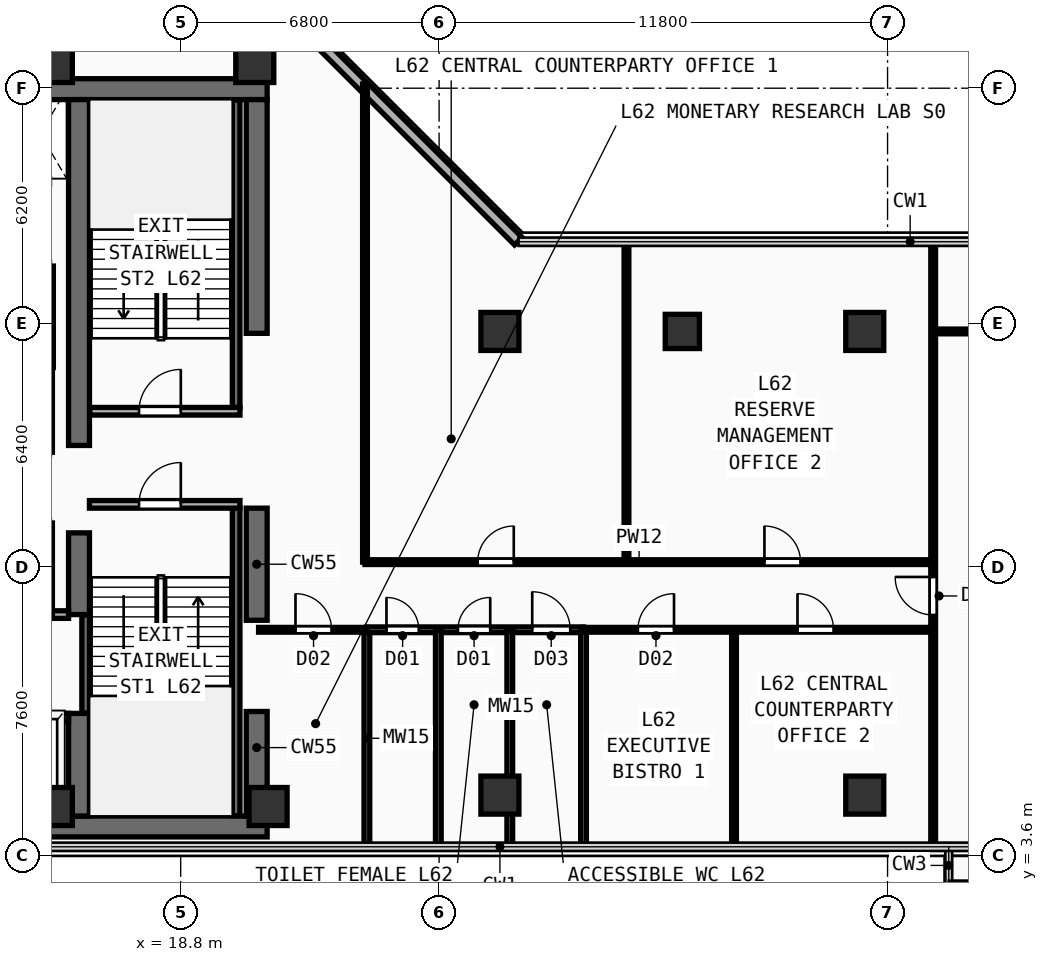
"""IFC4 building model, lengths in metres.
Left out: names, types, materials, properties, quantities, classifications, styles, units other than length and angle.
Written with IfcOpenShell. Run it as: python <this file> out.ifc"""

import sys

from ifc_helpers import new_model, si_unit, direction, frame, frame_2d, origin, origin_2d, place, context, subcontext, project, spatial, rectangle, extrude, element, fill, save


model = new_model("IFC4")
c1 = context("Model", 3, precision=1e-05, world=origin(), true_north=direction((0.0, 1.0)))
c2 = subcontext(c1, "Body", "Model", "MODEL_VIEW")
j1 = project(units=[si_unit("LENGTHUNIT", "METRE"), si_unit("PLANEANGLEUNIT", "RADIAN")], contexts=[c1])
p1 = place(None, origin())
s1 = spatial("IfcSite", under=j1, at=p1, CompositionType="ELEMENT")
p2 = place(p1, origin())
s2 = spatial("IfcBuilding", under=s1, at=p2, CompositionType="ELEMENT")
p3 = place(p2, frame((0.0, 0.0, 242.5)))
s3 = spatial("IfcBuildingStorey", under=s2, at=p3, CompositionType="ELEMENT", Elevation=242.5)
for number, where, z_axis, x_axis in (
    (1, (7.175, 4.375, 0.0), (0.0, 0.0, 1.0), (1.0, 0.0, 0.0)),
    (2, (7.175, 23.775, 0.0), (0.0, 0.0, 1.0), (1.0, 0.0, 0.0)),
):
    element("IfcWall", number, at=place(p3, frame(where, z_axis=z_axis, x_axis=x_axis)), inside=s3, PredefinedType="SHEAR", context=c2, shape_type="SweptSolid", body=[
        extrude(rectangle(XDim=13.9, YDim=0.55, at=frame_2d((6.95, 0.0))), origin(), (0.0, 0.0, 1.0), 3.56),
    ])
p4 = place(p3, frame((20.8, 4.65, 0.0), z_axis=(0.0, 0.0, 1.0), x_axis=(0.0, 1.0, 0.0)))
e3 = element("IfcWall", 3, at=p4, inside=s3, PredefinedType="SHEAR", context=c2, shape_type="SweptSolid", body=[
    extrude(rectangle(XDim=2.75, YDim=0.55, at=frame_2d((1.375, 0.0))), origin(), (0.0, 0.0, 1.0), 3.56),
])
p5 = place(p3, frame((20.8, 9.8, 0.0), z_axis=(0.0, 0.0, 1.0), x_axis=(0.0, 1.0, 0.0)))
e4 = element("IfcWall", 4, at=p5, inside=s3, PredefinedType="SHEAR", context=c2, shape_type="SweptSolid", body=[
    extrude(rectangle(XDim=2.95, YDim=0.55, at=frame_2d((1.475, 0.0))), origin(), (0.0, 0.0, 1.0), 3.56),
])
p6 = place(p3, frame((20.8, 17.35, 0.0), z_axis=(0.0, 0.0, 1.0), x_axis=(0.0, 1.0, 0.0)))
e5 = element("IfcWall", 5, at=p6, inside=s3, PredefinedType="SHEAR", context=c2, shape_type="SweptSolid", body=[
    extrude(rectangle(XDim=6.15, YDim=0.55, at=frame_2d((3.075, 0.0))), origin(), (0.0, 0.0, 1.0), 3.56),
])
p7 = place(p3, frame((16.125, 4.65, 0.0), z_axis=(0.0, 0.0, 1.0), x_axis=(0.0, 1.0, 0.0)))
e6 = element("IfcWall", 6, at=p7, inside=s3, PredefinedType="SHEAR", context=c2, shape_type="SweptSolid", body=[
    extrude(rectangle(XDim=2.7, YDim=0.55, at=frame_2d((1.35, 0.0))), origin(), (0.0, 0.0, 1.0), 3.56),
])
p8 = place(p3, frame((16.125, 9.95, 0.0), z_axis=(0.0, 0.0, 1.0), x_axis=(0.0, 1.0, 0.0)))
e7 = element("IfcWall", 7, at=p8, inside=s3, PredefinedType="SHEAR", context=c2, shape_type="SweptSolid", body=[
    extrude(rectangle(XDim=2.15, YDim=0.55, at=frame_2d((1.075, 0.0))), origin(), (0.0, 0.0, 1.0), 3.56),
])
p9 = place(p3, frame((16.125, 14.4, 0.0), z_axis=(0.0, 0.0, 1.0), x_axis=(0.0, 1.0, 0.0)))
e8 = element("IfcWall", 8, at=p9, inside=s3, PredefinedType="SHEAR", context=c2, shape_type="SweptSolid", body=[
    extrude(rectangle(XDim=9.1, YDim=0.55, at=frame_2d((4.55, 0.0))), origin(), (0.0, 0.0, 1.0), 3.56),
])
for number, where, z_axis, x_axis in (
    (9, (15.45, 4.9, 0.0), (0.0, 0.0, 1.0), (1.0, 0.0, 0.0)),
    (10, (21.1, 4.9, 0.0), (0.0, 0.0, 1.0), (1.0, 0.0, 0.0)),
    (11, (15.45, 24.45, 0.0), (0.0, 0.0, 1.0), (1.0, 0.0, 0.0)),
    (12, (20.75, 24.45, 0.0), (0.0, 0.0, 1.0), (1.0, 0.0, 0.0)),
    (13, (27.2, 5.2, 0.0), (0.0, 0.0, 1.0), (1.0, 0.0, 0.0)),
    (14, (36.8, 5.2, 0.0), (0.0, 0.0, 1.0), (1.0, 0.0, 0.0)),
    (15, (27.2, 17.4, 0.0), (0.0, 0.0, 1.0), (1.0, 0.0, 0.0)),
    (16, (36.8, 17.4, 0.0), (0.0, 0.0, 1.0), (1.0, 0.0, 0.0)),
):
    element("IfcColumn", number, at=place(p3, frame(where, z_axis=z_axis, x_axis=x_axis)), inside=s3, PredefinedType="COLUMN", context=c2, shape_type="SweptSolid", body=[
        extrude(rectangle(XDim=1.0, YDim=1.0, at=origin_2d()), origin(), (0.0, 0.0, 1.0), 3.56),
    ])
p10 = place(p3, frame((32.0, 17.4, 0.0), z_axis=(0.0, 0.0, 1.0), x_axis=(1.0, 0.0, 0.0)))
e17 = element("IfcColumn", 17, at=p10, inside=s3, PredefinedType="COLUMN", context=c2, shape_type="SweptSolid", body=[
    extrude(rectangle(XDim=0.9, YDim=0.9, at=origin_2d()), origin(), (0.0, 0.0, 1.0), 3.56),
])
p11 = place(p3, frame((27.685, 19.775, 0.0), z_axis=(0.0, 0.0, 1.0), x_axis=(-0.707106781187, 0.707106781187, 0.0)))
e18 = element("IfcWall", 18, at=p11, inside=s3, PredefinedType="SOLIDWALL", context=c2, shape_type="SweptSolid", body=[
    extrude(rectangle(XDim=9.207, YDim=0.28, at=frame_2d((4.603, 0.0))), origin(), (0.0, 0.0, 1.0), 3.56),
])
p12 = place(p3, frame((16.3, 7.36, 0.0), z_axis=(0.0, 0.0, 1.0), x_axis=(0.0, 1.0, 0.0)))
e19 = element("IfcWall", 19, at=p12, inside=s3, PredefinedType="SHEAR", context=c2, shape_type="SweptSolid", body=[
    extrude(rectangle(XDim=2.58, YDim=0.2, at=frame_2d((1.29, 0.0))), origin(), (0.0, 0.0, 1.0), 3.56),
])
p13 = place(p3, frame((20.26, 4.66, 0.0), z_axis=(0.0, 0.0, 1.0), x_axis=(0.0, 1.0, 0.0)))
e20 = element("IfcWall", 20, at=p13, inside=s3, PredefinedType="SHEAR", context=c2, shape_type="SweptSolid", body=[
    extrude(rectangle(XDim=8.09, YDim=0.2, at=frame_2d((4.045, 0.0))), origin(), (0.0, 0.0, 1.0), 3.56),
])
p14 = place(p3, frame((16.4, 12.85, 0.0), z_axis=(0.0, 0.0, 1.0), x_axis=(1.0, 0.0, 0.0)))
e21 = element("IfcWall", 21, at=p14, inside=s3, PredefinedType="PARTITIONING", context=c2, shape_type="SweptSolid", body=[
    extrude(rectangle(XDim=3.96, YDim=0.2, at=frame_2d((1.98, 0.0))), origin(), (0.0, 0.0, 1.0), 3.56),
])
p15 = place(p14, frame((1.304, 0.0, 0.0)))
e22 = element("IfcOpeningElement", 22, at=p15, cuts=e21, PredefinedType="OPENING", context=c2, shape_type="SweptSolid", body=[
    extrude(rectangle(XDim=1.1, YDim=2.2, at=frame_2d((0.55, 1.1))), frame((0.0, 0.11, 0.0), z_axis=(0.0, -1.0, 0.0), x_axis=(1.0, 0.0, 0.0)), (0.0, 0.0, 1.0), 0.22),
])
p16 = place(p3, frame((20.26, 15.4, 0.0), z_axis=(0.0, 0.0, 1.0), x_axis=(0.0, 1.0, 0.0)))
e23 = element("IfcWall", 23, at=p16, inside=s3, PredefinedType="SHEAR", context=c2, shape_type="SweptSolid", body=[
    extrude(rectangle(XDim=8.09, YDim=0.2, at=frame_2d((4.045, 0.0))), origin(), (0.0, 0.0, 1.0), 3.56),
])
p17 = place(p3, frame((16.41, 15.3, 0.0), z_axis=(0.0, 0.0, 1.0), x_axis=(1.0, 0.0, 0.0)))
e24 = element("IfcWall", 24, at=p17, inside=s3, PredefinedType="PARTITIONING", context=c2, shape_type="SweptSolid", body=[
    extrude(rectangle(XDim=3.95, YDim=0.2, at=frame_2d((1.975, 0.0))), origin(), (0.0, 0.0, 1.0), 3.56),
])
p18 = place(p17, frame((1.294, 0.0, 0.0)))
e25 = element("IfcOpeningElement", 25, at=p18, cuts=e24, PredefinedType="OPENING", context=c2, shape_type="SweptSolid", body=[
    extrude(rectangle(XDim=1.1, YDim=2.2, at=frame_2d((0.55, 1.1))), frame((0.0, 0.11, 0.0), z_axis=(0.0, -1.0, 0.0), x_axis=(1.0, 0.0, 0.0)), (0.0, 0.0, 1.0), 0.22),
])
p19 = place(p3, frame((7.5, 7.25, 0.0), z_axis=(0.0, 0.0, 1.0), x_axis=(1.0, 0.0, 0.0)))
e26 = element("IfcWall", 26, at=p19, inside=s3, PredefinedType="PARTITIONING", context=c2, shape_type="SweptSolid", body=[
    extrude(rectangle(XDim=8.35, YDim=0.2, at=frame_2d((4.175, 0.0))), origin(), (0.0, 0.0, 1.0), 3.56),
])
p20 = place(p19, frame((0.53, 0.0, 0.0)))
e27 = element("IfcOpeningElement", 27, at=p20, cuts=e26, PredefinedType="OPENING", context=c2, shape_type="SweptSolid", body=[
    extrude(rectangle(XDim=1.1, YDim=2.2, at=frame_2d((0.55, 1.1))), frame((0.0, 0.11, 0.0), z_axis=(0.0, -1.0, 0.0), x_axis=(1.0, 0.0, 0.0)), (0.0, 0.0, 1.0), 0.22),
])
p21 = place(p19, frame((2.37, 0.0, 0.0)))
e28 = element("IfcOpeningElement", 28, at=p21, cuts=e26, PredefinedType="OPENING", context=c2, shape_type="SweptSolid", body=[
    extrude(rectangle(XDim=1.1, YDim=2.2, at=frame_2d((0.55, 1.1))), frame((0.0, 0.11, 0.0), z_axis=(0.0, -1.0, 0.0), x_axis=(1.0, 0.0, 0.0)), (0.0, 0.0, 1.0), 0.22),
])
p22 = place(p19, frame((4.33, 0.0, 0.0)))
e29 = element("IfcOpeningElement", 29, at=p22, cuts=e26, PredefinedType="OPENING", context=c2, shape_type="SweptSolid", body=[
    extrude(rectangle(XDim=1.1, YDim=2.2, at=frame_2d((0.55, 1.1))), frame((0.0, 0.11, 0.0), z_axis=(0.0, -1.0, 0.0), x_axis=(1.0, 0.0, 0.0)), (0.0, 0.0, 1.0), 0.22),
])
p23 = place(p19, frame((6.5, 0.0, 0.0)))
e30 = element("IfcOpeningElement", 30, at=p23, cuts=e26, PredefinedType="OPENING", context=c2, shape_type="SweptSolid", body=[
    extrude(rectangle(XDim=1.1, YDim=2.2, at=frame_2d((0.55, 1.1))), frame((0.0, 0.11, 0.0), z_axis=(0.0, -1.0, 0.0), x_axis=(1.0, 0.0, 0.0)), (0.0, 0.0, 1.0), 0.22),
])
p24 = place(p3, frame((7.5, 9.95, 0.0), z_axis=(0.0, 0.0, 1.0), x_axis=(1.0, 0.0, 0.0)))
e31 = element("IfcWall", 31, at=p24, inside=s3, PredefinedType="PARTITIONING", context=c2, shape_type="SweptSolid", body=[
    extrude(rectangle(XDim=8.35, YDim=0.2, at=frame_2d((4.175, 0.0))), origin(), (0.0, 0.0, 1.0), 3.56),
])
p25 = place(p3, frame((15.35, 9.95, 0.0), z_axis=(0.0, 0.0, 1.0), x_axis=(0.0, 1.0, 0.0)))
e32 = element("IfcWall", 32, at=p25, inside=s3, PredefinedType="PARTITIONING", context=c2, shape_type="SweptSolid", body=[
    extrude(rectangle(XDim=2.41, YDim=0.15, at=frame_2d((1.205, 0.0))), origin(), (0.0, 0.0, 1.0), 3.56),
])
p26 = place(p3, frame((15.35, 14.22, 0.0), z_axis=(0.0, 0.0, 1.0), x_axis=(0.0, 1.0, 0.0)))
e33 = element("IfcWall", 33, at=p26, inside=s3, PredefinedType="PARTITIONING", context=c2, shape_type="SweptSolid", body=[
    extrude(rectangle(XDim=2.23, YDim=0.15, at=frame_2d((1.115, 0.0))), origin(), (0.0, 0.0, 1.0), 3.56),
])
p27 = place(p3, frame((15.35, 16.45, 0.0), z_axis=(0.0, 0.0, 1.0), x_axis=(0.0, 1.0, 0.0)))
e34 = element("IfcWall", 34, at=p27, inside=s3, PredefinedType="PARTITIONING", context=c2, shape_type="SweptSolid", body=[
    extrude(rectangle(XDim=2.67, YDim=0.2, at=frame_2d((1.335, 0.0))), origin(), (0.0, 0.0, 1.0), 3.56),
])
p28 = place(p3, frame((23.7, 3.84, 0.0), z_axis=(0.0, 0.0, 1.0), x_axis=(0.0, 1.0, 0.0)))
e35 = element("IfcWall", 35, at=p28, inside=s3, PredefinedType="PLUMBINGWALL", context=c2, shape_type="SweptSolid", body=[
    extrude(rectangle(XDim=5.71, YDim=0.15, at=frame_2d((2.855, 0.0))), origin(), (0.0, 0.0, 1.0), 3.56),
])
p29 = place(p3, frame((23.7, 9.55, 0.0), z_axis=(0.0, 0.0, 1.0), x_axis=(1.0, 0.0, 0.0)))
e36 = element("IfcWall", 36, at=p29, inside=s3, PredefinedType="PLUMBINGWALL", context=c2, shape_type="SweptSolid", body=[
    extrude(rectangle(XDim=5.7, YDim=0.15, at=frame_2d((2.85, 0.0))), origin(), (0.0, 0.0, 1.0), 3.2),
])
p30 = place(p29, frame((0.515, 0.0, 0.0)))
e37 = element("IfcOpeningElement", 37, at=p30, cuts=e36, PredefinedType="OPENING", context=c2, shape_type="SweptSolid", body=[
    extrude(rectangle(XDim=0.85, YDim=2.15, at=frame_2d((0.425, 1.075))), frame((0.0, 0.085, 0.0), z_axis=(0.0, -1.0, 0.0), x_axis=(1.0, 0.0, 0.0)), (0.0, 0.0, 1.0), 0.17),
])
p31 = place(p29, frame((2.395, 0.0, 0.0)))
e38 = element("IfcOpeningElement", 38, at=p31, cuts=e36, PredefinedType="OPENING", context=c2, shape_type="SweptSolid", body=[
    extrude(rectangle(XDim=0.85, YDim=2.15, at=frame_2d((0.425, 1.075))), frame((0.0, 0.085, 0.0), z_axis=(0.0, -1.0, 0.0), x_axis=(1.0, 0.0, 0.0)), (0.0, 0.0, 1.0), 0.17),
])
p32 = place(p29, frame((4.35, 0.0, 0.0)))
e39 = element("IfcOpeningElement", 39, at=p32, cuts=e36, PredefinedType="OPENING", context=c2, shape_type="SweptSolid", body=[
    extrude(rectangle(XDim=1.0, YDim=2.2, at=frame_2d((0.5, 1.1))), frame((0.0, 0.085, 0.0), z_axis=(0.0, -1.0, 0.0), x_axis=(1.0, 0.0, 0.0)), (0.0, 0.0, 1.0), 0.17),
])
p33 = place(p3, frame((25.58, 3.84, 0.0), z_axis=(0.0, 0.0, 1.0), x_axis=(0.0, 1.0, 0.0)))
e40 = element("IfcWall", 40, at=p33, inside=s3, PredefinedType="PLUMBINGWALL", context=c2, shape_type="SweptSolid", body=[
    extrude(rectangle(XDim=5.71, YDim=0.15, at=frame_2d((2.855, 0.0))), origin(), (0.0, 0.0, 1.0), 3.56),
])
p34 = place(p3, frame((27.46, 3.84, 0.0), z_axis=(0.0, 0.0, 1.0), x_axis=(0.0, 1.0, 0.0)))
e41 = element("IfcWall", 41, at=p34, inside=s3, PredefinedType="PLUMBINGWALL", context=c2, shape_type="SweptSolid", body=[
    extrude(rectangle(XDim=5.71, YDim=0.15, at=frame_2d((2.855, 0.0))), origin(), (0.0, 0.0, 1.0), 3.16),
])
p35 = place(p3, frame((29.4, 3.84, 0.0), z_axis=(0.0, 0.0, 1.0), x_axis=(0.0, 1.0, 0.0)))
e42 = element("IfcWall", 42, at=p35, inside=s3, PredefinedType="PLUMBINGWALL", context=c2, shape_type="SweptSolid", body=[
    extrude(rectangle(XDim=5.71, YDim=0.15, at=frame_2d((2.855, 0.0))), origin(), (0.0, 0.0, 1.0), 3.56),
])
p36 = place(p3, frame((20.85, 9.55, 0.0), z_axis=(0.0, 0.0, 1.0), x_axis=(1.0, 0.0, 0.0)))
e43 = element("IfcWall", 43, at=p36, inside=s3, PredefinedType="PARTITIONING", context=c2, shape_type="SweptSolid", body=[
    extrude(rectangle(XDim=2.85, YDim=0.125, at=frame_2d((1.425, 0.0))), origin(), (0.0, 0.0, 1.0), 3.2),
])
p37 = place(p36, frame((0.971, 0.0, 0.0)))
e44 = element("IfcOpeningElement", 44, at=p37, cuts=e43, PredefinedType="OPENING", context=c2, shape_type="SweptSolid", body=[
    extrude(rectangle(XDim=0.95, YDim=2.15, at=frame_2d((0.475, 1.075))), frame((0.0, 0.073, 0.0), z_axis=(0.0, -1.0, 0.0), x_axis=(1.0, 0.0, 0.0)), (0.0, 0.0, 1.0), 0.145),
])
p38 = place(p3, frame((29.4, 9.55, 0.0), z_axis=(0.0, 0.0, 1.0), x_axis=(1.0, 0.0, 0.0)))
e45 = element("IfcWall", 45, at=p38, inside=s3, PredefinedType="PARTITIONING", context=c2, shape_type="SweptSolid", body=[
    extrude(rectangle(XDim=9.2, YDim=0.125, at=frame_2d((4.6, 0.0))), origin(), (0.0, 0.0, 1.0), 3.2),
])
p39 = place(p38, frame((1.431, 0.0, 0.0)))
e46 = element("IfcOpeningElement", 46, at=p39, cuts=e45, PredefinedType="OPENING", context=c2, shape_type="SweptSolid", body=[
    extrude(rectangle(XDim=0.95, YDim=2.15, at=frame_2d((0.475, 1.075))), frame((0.0, 0.073, 0.0), z_axis=(0.0, -1.0, 0.0), x_axis=(1.0, 0.0, 0.0)), (0.0, 0.0, 1.0), 0.145),
])
p40 = place(p38, frame((5.63, 0.0, 0.0)))
e47 = element("IfcOpeningElement", 47, at=p40, cuts=e45, PredefinedType="OPENING", context=c2, shape_type="SweptSolid", body=[
    extrude(rectangle(XDim=0.95, YDim=2.15, at=frame_2d((0.475, 1.075))), frame((0.0, 0.073, 0.0), z_axis=(0.0, -1.0, 0.0), x_axis=(1.0, 0.0, 0.0)), (0.0, 0.0, 1.0), 0.145),
])
p41 = place(p3, frame((33.36, 3.84, 0.0), z_axis=(0.0, 0.0, 1.0), x_axis=(0.0, 1.0, 0.0)))
e48 = element("IfcWall", 48, at=p41, inside=s3, PredefinedType="PARTITIONING", context=c2, shape_type="SweptSolid", body=[
    extrude(rectangle(XDim=5.71, YDim=0.125, at=frame_2d((2.855, 0.0))), origin(), (0.0, 0.0, 1.0), 3.56),
])
p42 = place(p3, frame((38.6, 3.84, 0.0), z_axis=(0.0, 0.0, 1.0), x_axis=(0.0, 1.0, 0.0)))
e49 = element("IfcWall", 49, at=p42, inside=s3, PredefinedType="PARTITIONING", context=c2, shape_type="SweptSolid", body=[
    extrude(rectangle(XDim=15.92, YDim=0.125, at=frame_2d((7.96, 0.0))), origin(), (0.0, 0.0, 1.0), 3.56),
])
p43 = place(p42, frame((6.1, 0.0, 0.0)))
e50 = element("IfcOpeningElement", 50, at=p43, cuts=e49, PredefinedType="OPENING", context=c2, shape_type="SweptSolid", body=[
    extrude(rectangle(XDim=1.0, YDim=2.2, at=frame_2d((0.5, 1.1))), frame((0.0, 0.073, 0.0), z_axis=(0.0, -1.0, 0.0), x_axis=(1.0, 0.0, 0.0)), (0.0, 0.0, 1.0), 0.145),
])
p44 = place(p3, frame((38.6, 17.4, 0.0), z_axis=(0.0, 0.0, 1.0), x_axis=(1.0, 0.0, 0.0)))
e51 = element("IfcWall", 51, at=p44, inside=s3, PredefinedType="PARTITIONING", context=c2, shape_type="SweptSolid", body=[
    extrude(rectangle(XDim=12.56, YDim=0.125, at=frame_2d((6.28, 0.0))), origin(), (0.0, 0.0, 1.0), 3.26),
])
p45 = place(p44, frame((3.525, 0.0, 0.0)))
e52 = element("IfcOpeningElement", 52, at=p45, cuts=e51, PredefinedType="OPENING", context=c2, shape_type="SweptSolid", body=[
    extrude(rectangle(XDim=0.95, YDim=2.15, at=frame_2d((0.475, 1.075))), frame((0.0, 0.073, 0.0), z_axis=(0.0, -1.0, 0.0), x_axis=(1.0, 0.0, 0.0)), (0.0, 0.0, 1.0), 0.145),
])
p46 = place(p3, frame((23.65, 11.33, 0.0), z_axis=(0.0, 0.0, 1.0), x_axis=(0.0, 1.0, 0.0)))
e53 = element("IfcWall", 53, at=p46, inside=s3, PredefinedType="PARTITIONING", context=c2, shape_type="SweptSolid", body=[
    extrude(rectangle(XDim=12.58, YDim=0.125, at=frame_2d((6.29, 0.0))), origin(), (0.0, 0.0, 1.0), 3.56),
])
p47 = place(p3, frame((23.65, 11.33, 0.0), z_axis=(0.0, 0.0, 1.0), x_axis=(1.0, 0.0, 0.0)))
e54 = element("IfcWall", 54, at=p47, inside=s3, PredefinedType="PARTITIONING", context=c2, shape_type="SweptSolid", body=[
    extrude(rectangle(XDim=14.95, YDim=0.125, at=frame_2d((7.475, 0.0))), origin(), (0.0, 0.0, 1.0), 3.56),
])
p48 = place(p47, frame((2.965, 0.0, 0.0)))
e55 = element("IfcOpeningElement", 55, at=p48, cuts=e54, PredefinedType="OPENING", context=c2, shape_type="SweptSolid", body=[
    extrude(rectangle(XDim=0.95, YDim=2.15, at=frame_2d((0.475, 1.075))), frame((0.0, 0.073, 0.0), z_axis=(0.0, -1.0, 0.0), x_axis=(1.0, 0.0, 0.0)), (0.0, 0.0, 1.0), 0.145),
])
p49 = place(p47, frame((10.51, 0.0, 0.0)))
e56 = element("IfcOpeningElement", 56, at=p49, cuts=e54, PredefinedType="OPENING", context=c2, shape_type="SweptSolid", body=[
    extrude(rectangle(XDim=0.95, YDim=2.15, at=frame_2d((0.475, 1.075))), frame((0.0, 0.073, 0.0), z_axis=(0.0, -1.0, 0.0), x_axis=(1.0, 0.0, 0.0)), (0.0, 0.0, 1.0), 0.145),
])
p50 = place(p3, frame((30.53, 11.33, 0.0), z_axis=(0.0, 0.0, 1.0), x_axis=(0.0, 1.0, 0.0)))
e57 = element("IfcWall", 57, at=p50, inside=s3, PredefinedType="PARTITIONING", context=c2, shape_type="SweptSolid", body=[
    extrude(rectangle(XDim=8.43, YDim=0.125, at=frame_2d((4.215, 0.0))), origin(), (0.0, 0.0, 1.0), 3.56),
])
p51 = place(p15, frame((1.1, 0.0, 0.0), z_axis=(0.0, 0.0, 1.0), x_axis=(-1.0, 0.0, 0.0)))
e58 = element("IfcDoor", 58, at=p51, inside=s3, OperationType="SINGLE_SWING_LEFT", PredefinedType="DOOR", context=c2, shape_type="SweptSolid", body=[
    extrude(rectangle(XDim=1.1, YDim=2.2, at=frame_2d((0.55, 1.1))), frame((0.0, 0.025, 0.0), z_axis=(0.0, -1.0, 0.0), x_axis=(1.0, 0.0, 0.0)), (0.0, 0.0, 1.0), 0.05),
])
fill(e22, e58)
p52 = place(p18, origin())
e59 = element("IfcDoor", 59, at=p52, inside=s3, OperationType="SINGLE_SWING_RIGHT", PredefinedType="DOOR", context=c2, shape_type="SweptSolid", body=[
    extrude(rectangle(XDim=1.1, YDim=2.2, at=frame_2d((0.55, 1.1))), frame((0.0, 0.025, 0.0), z_axis=(0.0, -1.0, 0.0), x_axis=(1.0, 0.0, 0.0)), (0.0, 0.0, 1.0), 0.05),
])
fill(e25, e59)
p53 = place(p30, origin())
e60 = element("IfcDoor", 60, at=p53, inside=s3, OperationType="SINGLE_SWING_LEFT", PredefinedType="DOOR", context=c2, shape_type="SweptSolid", body=[
    extrude(rectangle(XDim=0.85, YDim=2.15, at=frame_2d((0.425, 1.075))), frame((0.0, 0.025, 0.0), z_axis=(0.0, -1.0, 0.0), x_axis=(1.0, 0.0, 0.0)), (0.0, 0.0, 1.0), 0.05),
])
fill(e37, e60)
p54 = place(p31, origin())
e61 = element("IfcDoor", 61, at=p54, inside=s3, OperationType="SINGLE_SWING_RIGHT", PredefinedType="DOOR", context=c2, shape_type="SweptSolid", body=[
    extrude(rectangle(XDim=0.85, YDim=2.15, at=frame_2d((0.425, 1.075))), frame((0.0, 0.025, 0.0), z_axis=(0.0, -1.0, 0.0), x_axis=(1.0, 0.0, 0.0)), (0.0, 0.0, 1.0), 0.05),
])
fill(e38, e61)
p55 = place(p32, origin())
e62 = element("IfcDoor", 62, at=p55, inside=s3, OperationType="SINGLE_SWING_LEFT", PredefinedType="DOOR", context=c2, shape_type="SweptSolid", body=[
    extrude(rectangle(XDim=1.0, YDim=2.2, at=frame_2d((0.5, 1.1))), frame((0.0, 0.025, 0.0), z_axis=(0.0, -1.0, 0.0), x_axis=(1.0, 0.0, 0.0)), (0.0, 0.0, 1.0), 0.05),
])
fill(e39, e62)
p56 = place(p37, origin())
e63 = element("IfcDoor", 63, at=p56, inside=s3, OperationType="SINGLE_SWING_LEFT", PredefinedType="DOOR", context=c2, shape_type="SweptSolid", body=[
    extrude(rectangle(XDim=0.95, YDim=2.15, at=frame_2d((0.475, 1.075))), frame((0.0, 0.025, 0.0), z_axis=(0.0, -1.0, 0.0), x_axis=(1.0, 0.0, 0.0)), (0.0, 0.0, 1.0), 0.05),
])
fill(e44, e63)
p57 = place(p39, origin())
e64 = element("IfcDoor", 64, at=p57, inside=s3, OperationType="SINGLE_SWING_RIGHT", PredefinedType="DOOR", context=c2, shape_type="SweptSolid", body=[
    extrude(rectangle(XDim=0.95, YDim=2.15, at=frame_2d((0.475, 1.075))), frame((0.0, 0.025, 0.0), z_axis=(0.0, -1.0, 0.0), x_axis=(1.0, 0.0, 0.0)), (0.0, 0.0, 1.0), 0.05),
])
fill(e46, e64)
p58 = place(p40, origin())
e65 = element("IfcDoor", 65, at=p58, inside=s3, OperationType="SINGLE_SWING_LEFT", PredefinedType="DOOR", context=c2, shape_type="SweptSolid", body=[
    extrude(rectangle(XDim=0.95, YDim=2.15, at=frame_2d((0.475, 1.075))), frame((0.0, 0.025, 0.0), z_axis=(0.0, -1.0, 0.0), x_axis=(1.0, 0.0, 0.0)), (0.0, 0.0, 1.0), 0.05),
])
fill(e47, e65)
p59 = place(p43, origin())
e66 = element("IfcDoor", 66, at=p59, inside=s3, OperationType="SINGLE_SWING_RIGHT", PredefinedType="DOOR", context=c2, shape_type="SweptSolid", body=[
    extrude(rectangle(XDim=1.0, YDim=2.2, at=frame_2d((0.5, 1.1))), frame((0.0, 0.025, 0.0), z_axis=(0.0, -1.0, 0.0), x_axis=(1.0, 0.0, 0.0)), (0.0, 0.0, 1.0), 0.05),
])
fill(e50, e66)
p60 = place(p48, origin())
e67 = element("IfcDoor", 67, at=p60, inside=s3, OperationType="SINGLE_SWING_RIGHT", PredefinedType="DOOR", context=c2, shape_type="SweptSolid", body=[
    extrude(rectangle(XDim=0.95, YDim=2.15, at=frame_2d((0.475, 1.075))), frame((0.0, 0.025, 0.0), z_axis=(0.0, -1.0, 0.0), x_axis=(1.0, 0.0, 0.0)), (0.0, 0.0, 1.0), 0.05),
])
fill(e55, e67)
p61 = place(p49, origin())
e68 = element("IfcDoor", 68, at=p61, inside=s3, OperationType="SINGLE_SWING_LEFT", PredefinedType="DOOR", context=c2, shape_type="SweptSolid", body=[
    extrude(rectangle(XDim=0.95, YDim=2.15, at=frame_2d((0.475, 1.075))), frame((0.0, 0.025, 0.0), z_axis=(0.0, -1.0, 0.0), x_axis=(1.0, 0.0, 0.0)), (0.0, 0.0, 1.0), 0.05),
])
fill(e56, e68)
save(model, sys.argv[1])
